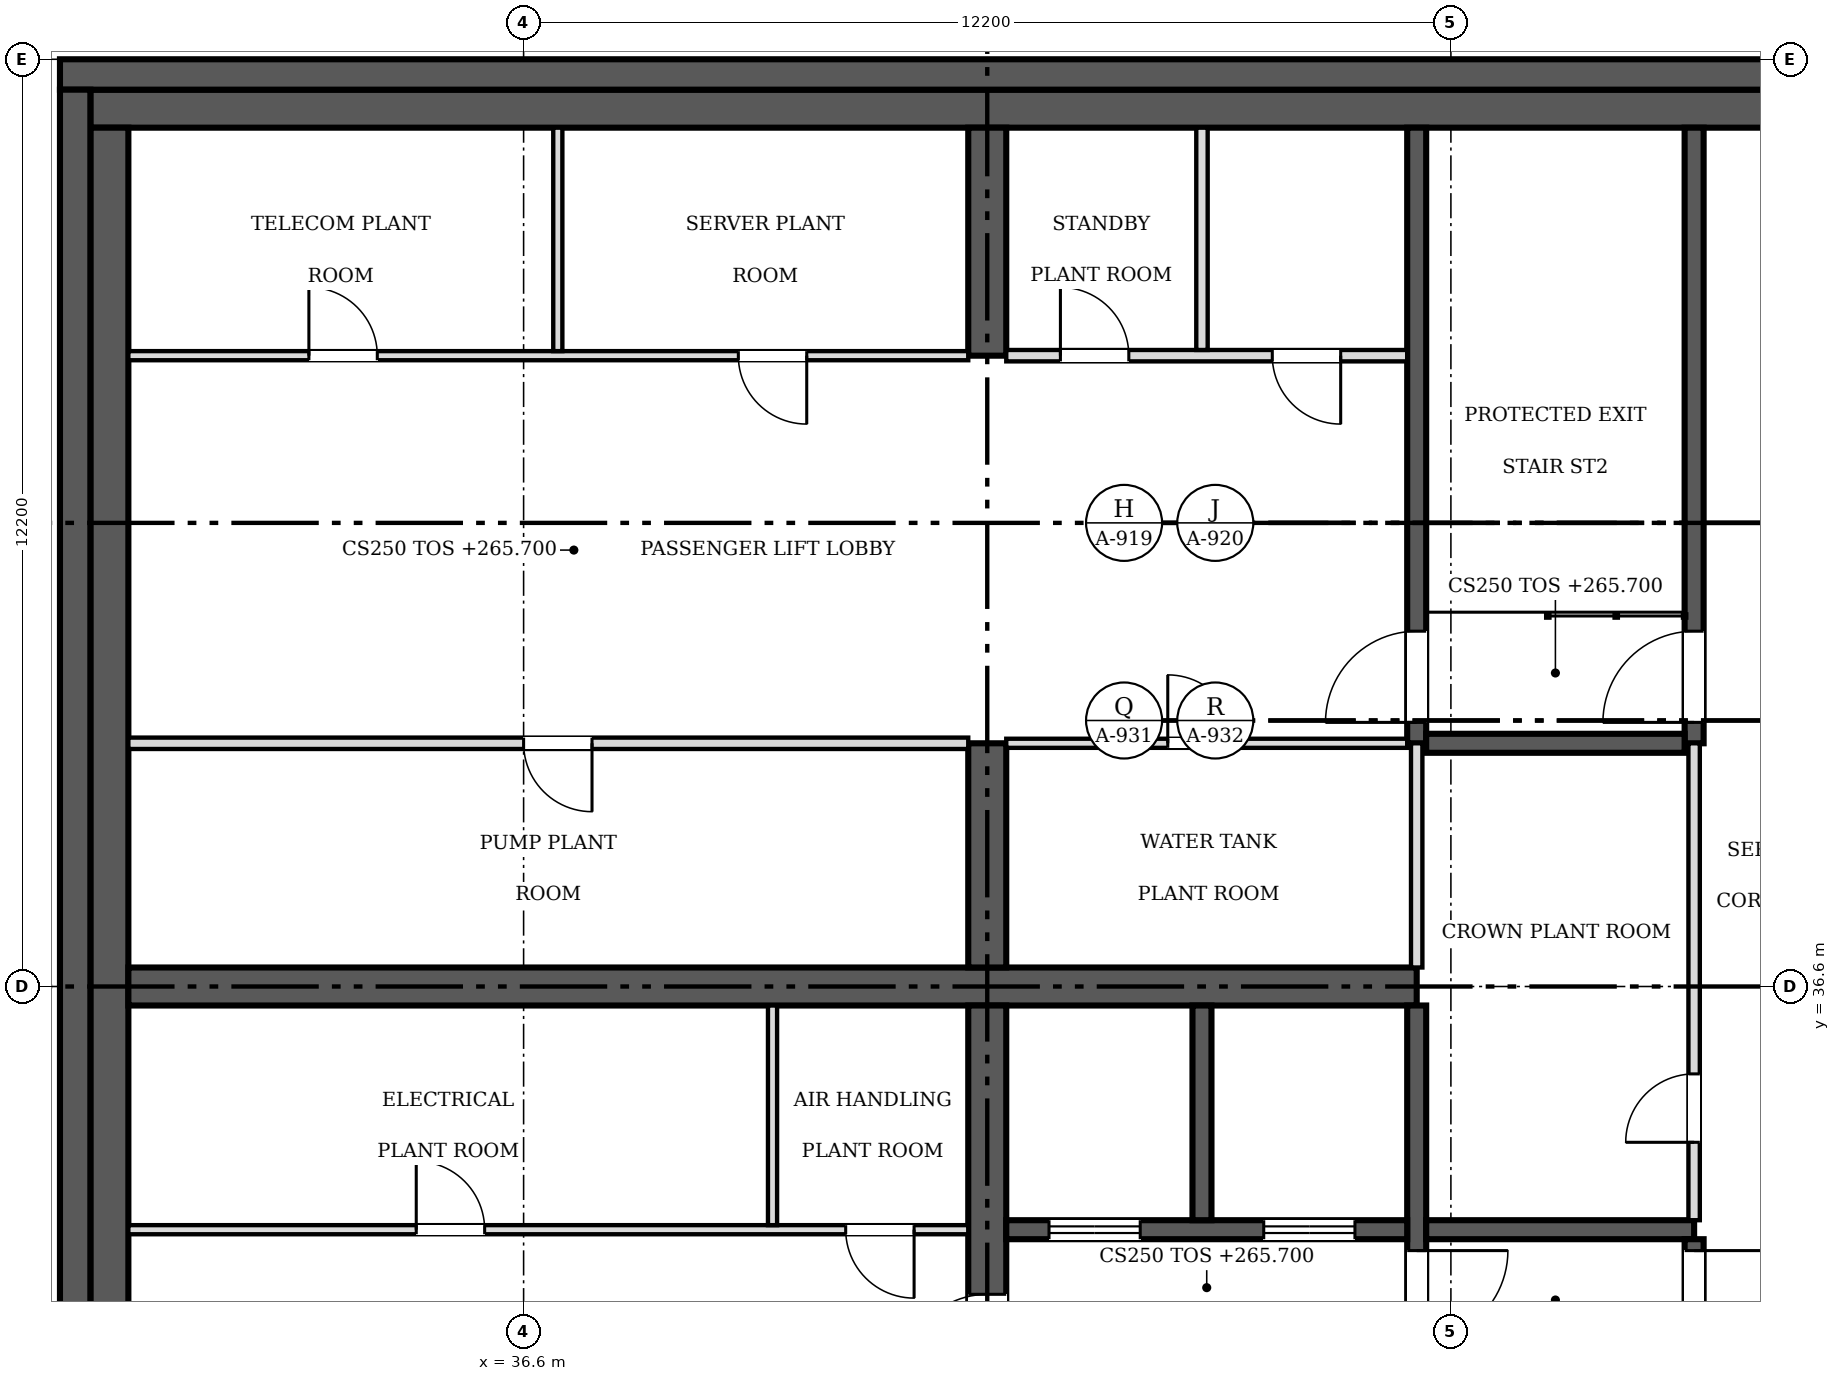
"""IFC4 building model, lengths in metres.
Left out: names, types, materials, properties, quantities, classifications, styles, units other than length and angle.
Written with IfcOpenShell. Run it as: python <this file> out.ifc"""

import sys

from ifc_helpers import new_model, si_unit, direction, frame, frame_2d, origin, place, context, subcontext, project, spatial, rectangle, extrude, source, transform, mapped, element, fill, save


model = new_model("IFC4")
c1 = context("Model", 3, precision=1e-05, world=origin(), true_north=direction((0.0, 1.0)))
c2 = subcontext(c1, "Body", "Model", "MODEL_VIEW")
j1 = project(units=[si_unit("LENGTHUNIT", "METRE"), si_unit("PLANEANGLEUNIT", "RADIAN")], contexts=[c1])
p1 = place(None, origin())
s1 = spatial("IfcSite", under=j1, at=p1, CompositionType="ELEMENT")
p2 = place(p1, origin())
s2 = spatial("IfcBuilding", under=s1, at=p2, CompositionType="ELEMENT")
p3 = place(p2, frame((0.0, 0.0, 265.7)))
s3 = spatial("IfcBuildingStorey", under=s2, at=p3, CompositionType="ELEMENT", Elevation=265.7)
p4 = place(p3, frame((30.7, 24.8, 0.0), z_axis=(0.0, 0.0, 1.0), x_axis=(0.0, 1.0, 0.0)))
e1 = element("IfcWall", 1, at=p4, inside=s3, PredefinedType="SHEAR", context=c2, shape_type="SweptSolid", body=[
    extrude(rectangle(XDim=23.6, YDim=0.4, at=frame_2d((11.8, 0.0))), origin(), (0.0, 0.0, 1.0), 4.2),
])
p5 = place(p3, frame((30.5, 48.6, 0.0), z_axis=(0.0, 0.0, 1.0), x_axis=(1.0, 0.0, 0.0)))
e2 = element("IfcWall", 2, at=p5, inside=s3, PredefinedType="SHEAR", context=c2, shape_type="SweptSolid", body=[
    extrude(rectangle(XDim=24.4, YDim=0.4, at=frame_2d((12.2, 0.0))), origin(), (0.0, 0.0, 1.0), 4.2),
])
p6 = place(p3, frame((30.9, 48.15, 0.0), z_axis=(0.0, 0.0, 1.0), x_axis=(1.0, 0.0, 0.0)))
e3 = element("IfcWall", 3, at=p6, inside=s3, PredefinedType="SOLIDWALL", context=c2, shape_type="SweptSolid", body=[
    extrude(rectangle(XDim=23.6, YDim=0.5, at=frame_2d((11.8, 0.0))), origin(), (0.0, 0.0, 1.0), 4.2),
])
p7 = place(p3, frame((31.15, 25.3, 0.0), z_axis=(0.0, 0.0, 1.0), x_axis=(0.0, 1.0, 0.0)))
e4 = element("IfcWall", 4, at=p7, inside=s3, PredefinedType="SOLIDWALL", context=c2, shape_type="SweptSolid", body=[
    extrude(rectangle(XDim=22.6, YDim=0.5, at=frame_2d((11.3, 0.0))), origin(), (0.0, 0.0, 1.0), 4.2),
])
p8 = place(p3, frame((31.4, 36.6, 0.0), z_axis=(0.0, 0.0, 1.0), x_axis=(1.0, 0.0, 0.0)))
e5 = element("IfcWall", 5, at=p8, inside=s3, PredefinedType="SHEAR", context=c2, shape_type="SweptSolid", body=[
    extrude(rectangle(XDim=16.95, YDim=0.5, at=frame_2d((8.475, 0.0))), origin(), (0.0, 0.0, 1.0), 4.2),
])
p9 = place(p3, frame((42.7, 36.35, 0.0), z_axis=(0.0, 0.0, 1.0), x_axis=(0.0, -1.0, 0.0)))
e6 = element("IfcWall", 6, at=p9, inside=s3, PredefinedType="SHEAR", context=c2, shape_type="SweptSolid", body=[
    extrude(rectangle(XDim=5.4, YDim=0.5, at=frame_2d((2.7, 0.0))), origin(), (0.0, 0.0, 1.0), 4.2),
])
m1 = source(origin(), c2, "Body", "SweptSolid", [
    extrude(rectangle(XDim=1.1, YDim=2.1, at=frame_2d((0.55, 1.05))), frame((0.0, 0.26, 0.0), z_axis=(0.0, -1.0, 0.0), x_axis=(1.0, 0.0, 0.0)), (0.0, 0.0, 1.0), 0.52),
])
p10 = place(p9, frame((3.8, 0.0, 0.0)))
e7 = element("IfcOpeningElement", 7, at=p10, cuts=e6, PredefinedType="OPENING", context=c2, shape_type="MappedRepresentation", body=[
    mapped(m1, transform((0.0, 0.0, 0.0), scale=1.0)),
])
p11 = place(p3, frame((42.7, 36.85, 0.0), z_axis=(0.0, 0.0, 1.0), x_axis=(0.0, 1.0, 0.0)))
e8 = element("IfcWall", 8, at=p11, inside=s3, PredefinedType="SHEAR", context=c2, shape_type="SweptSolid", body=[
    extrude(rectangle(XDim=2.95, YDim=0.5, at=frame_2d((1.475, 0.0))), origin(), (0.0, 0.0, 1.0), 4.2),
])
p12 = place(p3, frame((42.7, 44.9, 0.0), z_axis=(0.0, 0.0, 1.0), x_axis=(0.0, 1.0, 0.0)))
e9 = element("IfcWall", 9, at=p12, inside=s3, PredefinedType="SHEAR", context=c2, shape_type="SweptSolid", body=[
    extrude(rectangle(XDim=3.0, YDim=0.5, at=frame_2d((1.5, 0.0))), origin(), (0.0, 0.0, 1.0), 4.2),
])
p13 = place(p3, frame((48.35, 36.35, 0.0), z_axis=(0.0, 0.0, 1.0), x_axis=(0.0, -1.0, 0.0)))
e10 = element("IfcWall", 10, at=p13, inside=s3, PredefinedType="SOLIDWALL", context=c2, shape_type="SweptSolid", body=[
    extrude(rectangle(XDim=11.05, YDim=0.25, at=frame_2d((5.525, 0.0))), origin(), (0.0, 0.0, 1.0), 4.2),
])
m2 = source(origin(), c2, "Body", "SweptSolid", [
    extrude(rectangle(XDim=1.2, YDim=2.1, at=frame_2d((0.6, 1.05))), frame((0.0, 0.135, 0.0), z_axis=(0.0, -1.0, 0.0), x_axis=(1.0, 0.0, 0.0)), (0.0, 0.0, 1.0), 0.27),
])
p14 = place(p13, frame((3.225, 0.0, 0.0)))
e11 = element("IfcOpeningElement", 11, at=p14, cuts=e10, PredefinedType="OPENING", context=c2, shape_type="MappedRepresentation", body=[
    mapped(m2, transform((0.0, 0.0, 0.0), scale=1.0)),
])
p15 = place(p3, frame((48.225, 33.4, 0.0), z_axis=(0.0, 0.0, 1.0), x_axis=(-1.0, 0.0, 0.0)))
e12 = element("IfcWall", 12, at=p15, inside=s3, PredefinedType="SOLIDWALL", context=c2, shape_type="SweptSolid", body=[
    extrude(rectangle(XDim=5.275, YDim=0.25, at=frame_2d((2.638, 0.0))), origin(), (0.0, 0.0, 1.0), 4.2),
])
p16 = place(p15, frame((3.512, 0.0, 0.0)))
e13 = element("IfcOpeningElement", 13, at=p16, cuts=e12, PredefinedType="OPENING", context=c2, shape_type="MappedRepresentation", body=[
    mapped(m2, transform((0.0, 0.0, 0.0), scale=1.0)),
])
p17 = place(p15, frame((0.688, 0.0, 0.0)))
e14 = element("IfcOpeningElement", 14, at=p17, cuts=e12, PredefinedType="OPENING", context=c2, shape_type="MappedRepresentation", body=[
    mapped(m2, transform((0.0, 0.0, 0.0), scale=1.0)),
])
p18 = place(p3, frame((48.475, 33.4, 0.0), z_axis=(0.0, 0.0, 1.0), x_axis=(1.0, 0.0, 0.0)))
e15 = element("IfcWall", 15, at=p18, inside=s3, PredefinedType="SOLIDWALL", context=c2, shape_type="SweptSolid", body=[
    extrude(rectangle(XDim=3.525, YDim=0.25, at=frame_2d((1.762, 0.0))), origin(), (0.0, 0.0, 1.0), 4.2),
])
p19 = place(p3, frame((48.35, 47.9, 0.0), z_axis=(0.0, 0.0, 1.0), x_axis=(0.0, -1.0, 0.0)))
e16 = element("IfcWall", 16, at=p19, inside=s3, PredefinedType="SOLIDWALL", context=c2, shape_type="SweptSolid", body=[
    extrude(rectangle(XDim=8.1, YDim=0.25, at=frame_2d((4.05, 0.0))), origin(), (0.0, 0.0, 1.0), 4.2),
])
p20 = place(p19, frame((6.625, 0.0, 0.0)))
e17 = element("IfcOpeningElement", 17, at=p20, cuts=e16, PredefinedType="OPENING", context=c2, shape_type="MappedRepresentation", body=[
    mapped(m2, transform((0.0, 0.0, 0.0), scale=1.0)),
])
p21 = place(p3, frame((52.0, 25.3, 0.0), z_axis=(0.0, 0.0, 1.0), x_axis=(0.0, 1.0, 0.0)))
e18 = element("IfcWall", 18, at=p21, inside=s3, PredefinedType="SOLIDWALL", context=c2, shape_type="SweptSolid", body=[
    extrude(rectangle(XDim=7.975, YDim=0.25, at=frame_2d((3.987, 0.0))), origin(), (0.0, 0.0, 1.0), 4.2),
])
p22 = place(p21, frame((6.625, 0.0, 0.0)))
e19 = element("IfcOpeningElement", 19, at=p22, cuts=e18, PredefinedType="OPENING", context=c2, shape_type="MappedRepresentation", body=[
    mapped(m2, transform((0.0, 0.0, 0.0), scale=1.0)),
])
p23 = place(p3, frame((52.0, 39.8, 0.0), z_axis=(0.0, 0.0, 1.0), x_axis=(0.0, 1.0, 0.0)))
e20 = element("IfcWall", 20, at=p23, inside=s3, PredefinedType="SOLIDWALL", context=c2, shape_type="SweptSolid", body=[
    extrude(rectangle(XDim=8.1, YDim=0.25, at=frame_2d((4.05, 0.0))), origin(), (0.0, 0.0, 1.0), 4.2),
])
p24 = place(p23, frame((0.275, 0.0, 0.0)))
e21 = element("IfcOpeningElement", 21, at=p24, cuts=e20, PredefinedType="OPENING", context=c2, shape_type="MappedRepresentation", body=[
    mapped(m2, transform((0.0, 0.0, 0.0), scale=1.0)),
])
p25 = place(p3, frame((48.475, 39.8, 0.0), z_axis=(0.0, 0.0, 1.0), x_axis=(1.0, 0.0, 0.0)))
e22 = element("IfcWall", 22, at=p25, inside=s3, PredefinedType="SOLIDWALL", context=c2, shape_type="SweptSolid", body=[
    extrude(rectangle(XDim=3.4, YDim=0.25, at=frame_2d((1.7, 0.0))), origin(), (0.0, 0.0, 1.0), 4.2),
])
p26 = place(p3, frame((45.525, 33.525, 0.0), z_axis=(0.0, 0.0, 1.0), x_axis=(0.0, 1.0, 0.0)))
e23 = element("IfcWall", 23, at=p26, inside=s3, PredefinedType="SOLIDWALL", context=c2, shape_type="SweptSolid", body=[
    extrude(rectangle(XDim=2.825, YDim=0.25, at=frame_2d((1.413, 0.0))), origin(), (0.0, 0.0, 1.0), 4.2),
])
p27 = place(p3, frame((31.4, 33.4, 0.0), z_axis=(0.0, 0.0, 1.0), x_axis=(1.0, 0.0, 0.0)))
e24 = element("IfcWall", 24, at=p27, inside=s3, PredefinedType="PARTITIONING", context=c2, shape_type="SweptSolid", body=[
    extrude(rectangle(XDim=11.05, YDim=0.12, at=frame_2d((5.525, 0.0))), origin(), (0.0, 0.0, 1.0), 4.2),
])
m3 = source(origin(), c2, "Body", "SweptSolid", [
    extrude(rectangle(XDim=0.9, YDim=2.1, at=frame_2d((0.45, 1.05))), frame((0.0, 0.07, 0.0), z_axis=(0.0, -1.0, 0.0), x_axis=(1.0, 0.0, 0.0)), (0.0, 0.0, 1.0), 0.14),
])
p28 = place(p27, frame((3.788, 0.0, 0.0)))
e25 = element("IfcOpeningElement", 25, at=p28, cuts=e24, PredefinedType="OPENING", context=c2, shape_type="MappedRepresentation", body=[
    mapped(m3, transform((0.0, 0.0, 0.0), scale=1.0)),
])
p29 = place(p27, frame((9.438, 0.0, 0.0)))
e26 = element("IfcOpeningElement", 26, at=p29, cuts=e24, PredefinedType="OPENING", context=c2, shape_type="MappedRepresentation", body=[
    mapped(m3, transform((0.0, 0.0, 0.0), scale=1.0)),
])
p30 = place(p3, frame((42.45, 39.8, 0.0), z_axis=(0.0, 0.0, 1.0), x_axis=(-1.0, 0.0, 0.0)))
e27 = element("IfcWall", 27, at=p30, inside=s3, PredefinedType="PARTITIONING", context=c2, shape_type="SweptSolid", body=[
    extrude(rectangle(XDim=11.05, YDim=0.15, at=frame_2d((5.525, 0.0))), origin(), (0.0, 0.0, 1.0), 4.2),
])
m4 = source(origin(), c2, "Body", "SweptSolid", [
    extrude(rectangle(XDim=0.9, YDim=2.1, at=frame_2d((0.45, 1.05))), frame((0.0, 0.085, 0.0), z_axis=(0.0, -1.0, 0.0), x_axis=(1.0, 0.0, 0.0)), (0.0, 0.0, 1.0), 0.17),
])
p31 = place(p30, frame((4.95, 0.0, 0.0)))
e28 = element("IfcOpeningElement", 28, at=p31, cuts=e27, PredefinedType="OPENING", context=c2, shape_type="MappedRepresentation", body=[
    mapped(m4, transform((0.0, 0.0, 0.0), scale=1.0)),
])
p32 = place(p3, frame((31.4, 44.9, 0.0), z_axis=(0.0, 0.0, 1.0), x_axis=(1.0, 0.0, 0.0)))
e29 = element("IfcWall", 29, at=p32, inside=s3, PredefinedType="PARTITIONING", context=c2, shape_type="SweptSolid", body=[
    extrude(rectangle(XDim=11.05, YDim=0.12, at=frame_2d((5.525, 0.0))), origin(), (0.0, 0.0, 1.0), 4.2),
])
p33 = place(p32, frame((2.375, 0.0, 0.0)))
e30 = element("IfcOpeningElement", 30, at=p33, cuts=e29, PredefinedType="OPENING", context=c2, shape_type="MappedRepresentation", body=[
    mapped(m3, transform((0.0, 0.0, 0.0), scale=1.0)),
])
p34 = place(p32, frame((8.025, 0.0, 0.0)))
e31 = element("IfcOpeningElement", 31, at=p34, cuts=e29, PredefinedType="OPENING", context=c2, shape_type="MappedRepresentation", body=[
    mapped(m3, transform((0.0, 0.0, 0.0), scale=1.0)),
])
p35 = place(p3, frame((52.0, 33.525, 0.0), z_axis=(0.0, 0.0, 1.0), x_axis=(0.0, 1.0, 0.0)))
e32 = element("IfcWall", 32, at=p35, inside=s3, PredefinedType="PARTITIONING", context=c2, shape_type="SweptSolid", body=[
    extrude(rectangle(XDim=6.275, YDim=0.15, at=frame_2d((3.138, 0.0))), origin(), (0.0, 0.0, 1.0), 4.2),
])
p36 = place(p35, frame((1.025, 0.0, 0.0)))
e33 = element("IfcOpeningElement", 33, at=p36, cuts=e32, PredefinedType="OPENING", context=c2, shape_type="MappedRepresentation", body=[
    mapped(m4, transform((0.0, 0.0, 0.0), scale=1.0)),
])
p37 = place(p3, frame((48.225, 39.8, 0.0), z_axis=(0.0, 0.0, 1.0), x_axis=(-1.0, 0.0, 0.0)))
e34 = element("IfcWall", 34, at=p37, inside=s3, PredefinedType="PARTITIONING", context=c2, shape_type="SweptSolid", body=[
    extrude(rectangle(XDim=5.275, YDim=0.12, at=frame_2d((2.638, 0.0))), origin(), (0.0, 0.0, 1.0), 4.2),
])
p38 = place(p37, frame((2.25, 0.0, 0.0)))
e35 = element("IfcOpeningElement", 35, at=p38, cuts=e34, PredefinedType="OPENING", context=c2, shape_type="MappedRepresentation", body=[
    mapped(m3, transform((0.0, 0.0, 0.0), scale=1.0)),
])
p39 = place(p3, frame((42.95, 44.9, 0.0), z_axis=(0.0, 0.0, 1.0), x_axis=(1.0, 0.0, 0.0)))
e36 = element("IfcWall", 36, at=p39, inside=s3, PredefinedType="PARTITIONING", context=c2, shape_type="SweptSolid", body=[
    extrude(rectangle(XDim=5.275, YDim=0.15, at=frame_2d((2.638, 0.0))), origin(), (0.0, 0.0, 1.0), 4.2),
])
p40 = place(p39, frame((0.712, 0.0, 0.0)))
e37 = element("IfcOpeningElement", 37, at=p40, cuts=e36, PredefinedType="OPENING", context=c2, shape_type="MappedRepresentation", body=[
    mapped(m4, transform((0.0, 0.0, 0.0), scale=1.0)),
])
p41 = place(p39, frame((3.5, 0.0, 0.0)))
e38 = element("IfcOpeningElement", 38, at=p41, cuts=e36, PredefinedType="OPENING", context=c2, shape_type="MappedRepresentation", body=[
    mapped(m4, transform((0.0, 0.0, 0.0), scale=1.0)),
])
p42 = place(p3, frame((48.35, 36.85, 0.0), z_axis=(0.0, 0.0, 1.0), x_axis=(0.0, 1.0, 0.0)))
e39 = element("IfcWall", 39, at=p42, inside=s3, PredefinedType="PARTITIONING", context=c2, shape_type="SweptSolid", body=[
    extrude(rectangle(XDim=2.95, YDim=0.15, at=frame_2d((1.475, 0.0))), origin(), (0.0, 0.0, 1.0), 4.2),
])
p43 = place(p3, frame((39.875, 33.46, 0.0), z_axis=(0.0, 0.0, 1.0), x_axis=(0.0, 1.0, 0.0)))
e40 = element("IfcWall", 40, at=p43, inside=s3, PredefinedType="PARTITIONING", context=c2, shape_type="SweptSolid", body=[
    extrude(rectangle(XDim=2.89, YDim=0.12, at=frame_2d((1.445, 0.0))), origin(), (0.0, 0.0, 1.0), 4.2),
])
p44 = place(p3, frame((37.05, 44.96, 0.0), z_axis=(0.0, 0.0, 1.0), x_axis=(0.0, 1.0, 0.0)))
e41 = element("IfcWall", 41, at=p44, inside=s3, PredefinedType="PARTITIONING", context=c2, shape_type="SweptSolid", body=[
    extrude(rectangle(XDim=2.94, YDim=0.12, at=frame_2d((1.47, 0.0))), origin(), (0.0, 0.0, 1.0), 4.2),
])
p45 = place(p3, frame((45.525, 44.975, 0.0), z_axis=(0.0, 0.0, 1.0), x_axis=(0.0, 1.0, 0.0)))
e42 = element("IfcWall", 42, at=p45, inside=s3, PredefinedType="PARTITIONING", context=c2, shape_type="SweptSolid", body=[
    extrude(rectangle(XDim=2.925, YDim=0.15, at=frame_2d((1.462, 0.0))), origin(), (0.0, 0.0, 1.0), 4.2),
])
m5 = source(origin(), c2, "Body", "SweptSolid", [
    extrude(rectangle(XDim=1.1, YDim=2.1, at=frame_2d((0.55, 1.05))), frame((0.0, 0.025, 0.0), z_axis=(0.0, -1.0, 0.0), x_axis=(1.0, 0.0, 0.0)), (0.0, 0.0, 1.0), 0.05),
])
p46 = place(p10, origin())
e43 = element("IfcDoor", 43, at=p46, inside=s3, OperationType="SINGLE_SWING_RIGHT", PredefinedType="DOOR", context=c2, shape_type="MappedRepresentation", body=[
    mapped(m5, transform((0.0, 0.0, 0.0), scale=1.0)),
])
fill(e7, e43)
m6 = source(origin(), c2, "Body", "SweptSolid", [
    extrude(rectangle(XDim=1.2, YDim=2.1, at=frame_2d((0.6, 1.05))), frame((0.0, 0.025, 0.0), z_axis=(0.0, -1.0, 0.0), x_axis=(1.0, 0.0, 0.0)), (0.0, 0.0, 1.0), 0.05),
])
p47 = place(p14, origin())
e44 = element("IfcDoor", 44, at=p47, inside=s3, OperationType="SINGLE_SWING_LEFT", PredefinedType="DOOR", context=c2, shape_type="MappedRepresentation", body=[
    mapped(m6, transform((0.0, 0.0, 0.0), scale=1.0)),
])
fill(e11, e44)
p48 = place(p16, origin())
e45 = element("IfcDoor", 45, at=p48, inside=s3, OperationType="DOUBLE_DOOR_SLIDING", PredefinedType="DOOR", context=c2, shape_type="MappedRepresentation", body=[
    mapped(m6, transform((0.0, 0.0, 0.0), scale=1.0)),
])
fill(e13, e45)
p49 = place(p17, origin())
e46 = element("IfcDoor", 46, at=p49, inside=s3, OperationType="DOUBLE_DOOR_SLIDING", PredefinedType="DOOR", context=c2, shape_type="MappedRepresentation", body=[
    mapped(m6, transform((0.0, 0.0, 0.0), scale=1.0)),
])
fill(e14, e46)
p50 = place(p20, origin())
e47 = element("IfcDoor", 47, at=p50, inside=s3, OperationType="SINGLE_SWING_RIGHT", PredefinedType="DOOR", context=c2, shape_type="MappedRepresentation", body=[
    mapped(m6, transform((0.0, 0.0, 0.0), scale=1.0)),
])
fill(e17, e47)
p51 = place(p22, origin())
e48 = element("IfcDoor", 48, at=p51, inside=s3, OperationType="SINGLE_SWING_RIGHT", PredefinedType="DOOR", context=c2, shape_type="MappedRepresentation", body=[
    mapped(m6, transform((0.0, 0.0, 0.0), scale=1.0)),
])
fill(e19, e48)
p52 = place(p24, origin())
e49 = element("IfcDoor", 49, at=p52, inside=s3, OperationType="SINGLE_SWING_LEFT", PredefinedType="DOOR", context=c2, shape_type="MappedRepresentation", body=[
    mapped(m6, transform((0.0, 0.0, 0.0), scale=1.0)),
])
fill(e21, e49)
m7 = source(origin(), c2, "Body", "SweptSolid", [
    extrude(rectangle(XDim=0.9, YDim=2.1, at=frame_2d((0.45, 1.05))), frame((0.0, 0.025, 0.0), z_axis=(0.0, -1.0, 0.0), x_axis=(1.0, 0.0, 0.0)), (0.0, 0.0, 1.0), 0.05),
])
p53 = place(p28, origin())
e50 = element("IfcDoor", 50, at=p53, inside=s3, OperationType="SINGLE_SWING_LEFT", PredefinedType="DOOR", context=c2, shape_type="MappedRepresentation", body=[
    mapped(m7, transform((0.0, 0.0, 0.0), scale=1.0)),
])
fill(e25, e50)
p54 = place(p29, origin())
e51 = element("IfcDoor", 51, at=p54, inside=s3, OperationType="SINGLE_SWING_RIGHT", PredefinedType="DOOR", context=c2, shape_type="MappedRepresentation", body=[
    mapped(m7, transform((0.0, 0.0, 0.0), scale=1.0)),
])
fill(e26, e51)
p55 = place(p31, origin())
e52 = element("IfcDoor", 52, at=p55, inside=s3, OperationType="SINGLE_SWING_LEFT", PredefinedType="DOOR", context=c2, shape_type="MappedRepresentation", body=[
    mapped(m7, transform((0.0, 0.0, 0.0), scale=1.0)),
])
fill(e28, e52)
p56 = place(p33, origin())
e53 = element("IfcDoor", 53, at=p56, inside=s3, OperationType="SINGLE_SWING_LEFT", PredefinedType="DOOR", context=c2, shape_type="MappedRepresentation", body=[
    mapped(m7, transform((0.0, 0.0, 0.0), scale=1.0)),
])
fill(e30, e53)
p57 = place(p34, origin())
e54 = element("IfcDoor", 54, at=p57, inside=s3, OperationType="SINGLE_SWING_RIGHT", PredefinedType="DOOR", context=c2, shape_type="MappedRepresentation", body=[
    mapped(m7, transform((0.0, 0.0, 0.0), scale=1.0)),
])
fill(e31, e54)
p58 = place(p36, origin())
e55 = element("IfcDoor", 55, at=p58, inside=s3, OperationType="SINGLE_SWING_LEFT", PredefinedType="DOOR", context=c2, shape_type="MappedRepresentation", body=[
    mapped(m7, transform((0.0, 0.0, 0.0), scale=1.0)),
])
fill(e33, e55)
p59 = place(p38, origin())
e56 = element("IfcDoor", 56, at=p59, inside=s3, OperationType="SINGLE_SWING_RIGHT", PredefinedType="DOOR", context=c2, shape_type="MappedRepresentation", body=[
    mapped(m7, transform((0.0, 0.0, 0.0), scale=1.0)),
])
fill(e35, e56)
p60 = place(p40, origin())
e57 = element("IfcDoor", 57, at=p60, inside=s3, OperationType="SINGLE_SWING_LEFT", PredefinedType="DOOR", context=c2, shape_type="MappedRepresentation", body=[
    mapped(m7, transform((0.0, 0.0, 0.0), scale=1.0)),
])
fill(e37, e57)
p61 = place(p41, origin())
e58 = element("IfcDoor", 58, at=p61, inside=s3, OperationType="SINGLE_SWING_RIGHT", PredefinedType="DOOR", context=c2, shape_type="MappedRepresentation", body=[
    mapped(m7, transform((0.0, 0.0, 0.0), scale=1.0)),
])
fill(e38, e58)
save(model, sys.argv[1])
